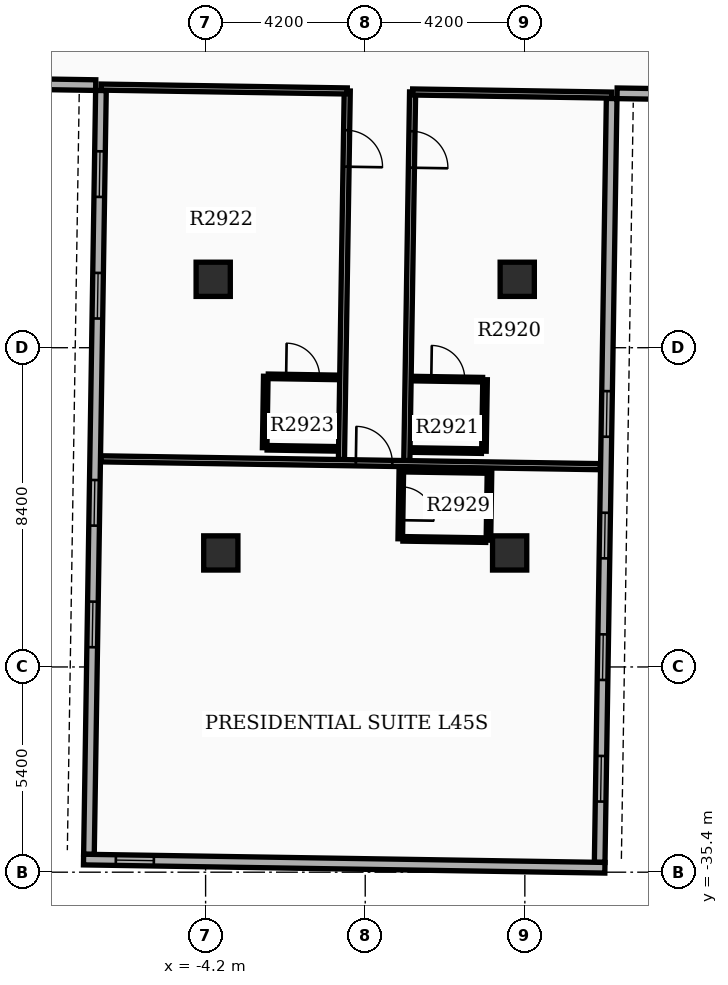
"""IFC4 building model, lengths in metres.
Left out: names, types, materials, properties, quantities, classifications, styles, units other than length and angle.
Written with IfcOpenShell. Run it as: python <this file> out.ifc"""

import sys

from ifc_helpers import new_model, si_unit, direction, frame, frame_2d, origin, origin_2d, place, context, subcontext, project, spatial, rectangle, extrude, element, fill, save


model = new_model("IFC4")
c1 = context("Model", 3, precision=1e-05, world=origin(), true_north=direction((0.0, 1.0)))
c2 = subcontext(c1, "Body", "Model", "MODEL_VIEW")
j1 = project(units=[si_unit("LENGTHUNIT", "METRE"), si_unit("PLANEANGLEUNIT", "RADIAN")], contexts=[c1])
p1 = place(None, origin())
s1 = spatial("IfcSite", under=j1, at=p1, CompositionType="ELEMENT")
p2 = place(p1, origin())
s2 = spatial("IfcBuilding", under=s1, at=p2, CompositionType="ELEMENT")
p3 = place(p2, frame((0.0, 0.0, 180.0)))
s3 = spatial("IfcBuildingStorey", under=s2, at=p3, CompositionType="ELEMENT", Elevation=180.0)
for number, where, z_axis, x_axis in (
    (1, (-4.0, -19.8, 0.0), (0.0, 0.0, 1.0), (1.0, 0.0, 0.0)),
    (2, (4.0, -19.8, 0.0), (0.0, 0.0, 1.0), (1.0, 0.0, 0.0)),
    (3, (-3.8, -27.0, 0.0), (0.0, 0.0, 1.0), (1.0, 0.0, 0.0)),
    (4, (3.8, -27.0, 0.0), (0.0, 0.0, 1.0), (1.0, 0.0, 0.0)),
):
    element("IfcColumn", number, at=place(p3, frame(where, z_axis=z_axis, x_axis=x_axis)), inside=s3, PredefinedType="COLUMN", context=c2, shape_type="SweptSolid", body=[
        extrude(rectangle(XDim=0.9, YDim=0.9, at=origin_2d()), origin(), (0.0, 0.0, 1.0), 3.9),
    ])
p4 = place(p3, frame((-6.954, -14.833, 0.0), z_axis=(0.0, 0.0, 1.0), x_axis=(-0.015705059908, -0.999876667941, 0.0)))
e5 = element("IfcWall", 5, at=p4, inside=s3, PredefinedType="STANDARD", context=c2, shape_type="SweptSolid", body=[
    extrude(rectangle(XDim=20.1, YDim=0.28, at=frame_2d((10.05, 0.0))), origin(), (0.0, 0.0, 1.0), 2.97),
])
p5 = place(p4, frame((1.6, 0.0, 0.8)))
e6 = element("IfcOpeningElement", 6, at=p5, cuts=e5, PredefinedType="OPENING", context=c2, shape_type="SweptSolid", body=[
    extrude(rectangle(XDim=1.2, YDim=1.6, at=frame_2d((0.6, 0.8))), frame((0.0, 0.15, 0.0), z_axis=(0.0, -1.0, 0.0), x_axis=(1.0, 0.0, 0.0)), (0.0, 0.0, 1.0), 0.3),
])
p6 = place(p4, frame((4.8, 0.0, 0.8)))
e7 = element("IfcOpeningElement", 7, at=p6, cuts=e5, PredefinedType="OPENING", context=c2, shape_type="SweptSolid", body=[
    extrude(rectangle(XDim=1.2, YDim=1.6, at=frame_2d((0.6, 0.8))), frame((0.0, 0.15, 0.0), z_axis=(0.0, -1.0, 0.0), x_axis=(1.0, 0.0, 0.0)), (0.0, 0.0, 1.0), 0.3),
])
p7 = place(p4, frame((10.25, 0.0, 0.8)))
e8 = element("IfcOpeningElement", 8, at=p7, cuts=e5, PredefinedType="OPENING", context=c2, shape_type="SweptSolid", body=[
    extrude(rectangle(XDim=1.2, YDim=1.6, at=frame_2d((0.6, 0.8))), frame((0.0, 0.15, 0.0), z_axis=(0.0, -1.0, 0.0), x_axis=(1.0, 0.0, 0.0)), (0.0, 0.0, 1.0), 0.3),
])
p8 = place(p4, frame((13.45, 0.0, 0.8)))
e9 = element("IfcOpeningElement", 9, at=p8, cuts=e5, PredefinedType="OPENING", context=c2, shape_type="SweptSolid", body=[
    extrude(rectangle(XDim=1.2, YDim=1.6, at=frame_2d((0.6, 0.8))), frame((0.0, 0.15, 0.0), z_axis=(0.0, -1.0, 0.0), x_axis=(1.0, 0.0, 0.0)), (0.0, 0.0, 1.0), 0.3),
])
p9 = place(p3, frame((6.169, -35.141, 0.0), z_axis=(0.0, 0.0, 1.0), x_axis=(0.01571739401, 0.999876474133, 0.0)))
e10 = element("IfcWall", 10, at=p9, inside=s3, PredefinedType="STANDARD", context=c2, shape_type="SweptSolid", body=[
    extrude(rectangle(XDim=20.1, YDim=0.28, at=frame_2d((10.05, 0.0))), origin(), (0.0, 0.0, 1.0), 2.97),
])
p10 = place(p9, frame((1.6, 0.0, 0.8)))
e11 = element("IfcOpeningElement", 11, at=p10, cuts=e10, PredefinedType="OPENING", context=c2, shape_type="SweptSolid", body=[
    extrude(rectangle(XDim=1.2, YDim=1.6, at=frame_2d((0.6, 0.8))), frame((0.0, 0.15, 0.0), z_axis=(0.0, -1.0, 0.0), x_axis=(1.0, 0.0, 0.0)), (0.0, 0.0, 1.0), 0.3),
])
p11 = place(p9, frame((4.8, 0.0, 0.8)))
e12 = element("IfcOpeningElement", 12, at=p11, cuts=e10, PredefinedType="OPENING", context=c2, shape_type="SweptSolid", body=[
    extrude(rectangle(XDim=1.2, YDim=1.6, at=frame_2d((0.6, 0.8))), frame((0.0, 0.15, 0.0), z_axis=(0.0, -1.0, 0.0), x_axis=(1.0, 0.0, 0.0)), (0.0, 0.0, 1.0), 0.3),
])
p12 = place(p9, frame((8.0, 0.0, 0.8)))
e13 = element("IfcOpeningElement", 13, at=p12, cuts=e10, PredefinedType="OPENING", context=c2, shape_type="SweptSolid", body=[
    extrude(rectangle(XDim=1.2, YDim=1.6, at=frame_2d((0.6, 0.8))), frame((0.0, 0.15, 0.0), z_axis=(0.0, -1.0, 0.0), x_axis=(1.0, 0.0, 0.0)), (0.0, 0.0, 1.0), 0.3),
])
p13 = place(p9, frame((11.2, 0.0, 0.8)))
e14 = element("IfcOpeningElement", 14, at=p13, cuts=e10, PredefinedType="OPENING", context=c2, shape_type="SweptSolid", body=[
    extrude(rectangle(XDim=1.2, YDim=1.6, at=frame_2d((0.6, 0.8))), frame((0.0, 0.15, 0.0), z_axis=(0.0, -1.0, 0.0), x_axis=(1.0, 0.0, 0.0)), (0.0, 0.0, 1.0), 0.3),
])
p14 = place(p3, frame((-7.412, -35.068, 0.0), z_axis=(0.0, 0.0, 1.0), x_axis=(0.999876549481, -0.015712599986, 0.0)))
e15 = element("IfcWall", 15, at=p14, inside=s3, PredefinedType="STANDARD", context=c2, shape_type="SweptSolid", body=[
    extrude(rectangle(XDim=13.72, YDim=0.28, at=frame_2d((6.86, 0.0))), origin(), (0.0, 0.0, 1.0), 2.97),
])
p15 = place(p14, frame((0.85, 0.0, 0.85)))
e16 = element("IfcOpeningElement", 16, at=p15, cuts=e15, PredefinedType="OPENING", context=c2, shape_type="SweptSolid", body=[
    extrude(rectangle(XDim=1.0, YDim=1.5, at=frame_2d((0.5, 0.75))), frame((0.0, 0.15, 0.0), z_axis=(0.0, -1.0, 0.0), x_axis=(1.0, 0.0, 0.0)), (0.0, 0.0, 1.0), 0.3),
])
p16 = place(p3, frame((-13.391, -14.592, 0.0), z_axis=(0.0, 0.0, 1.0), x_axis=(0.999876833368, -0.015694524359, 0.0)))
e17 = element("IfcWall", 17, at=p16, inside=s3, PredefinedType="STANDARD", context=c2, shape_type="SweptSolid", body=[
    extrude(rectangle(XDim=6.3, YDim=0.28, at=frame_2d((3.15, 0.0))), origin(), (0.0, 0.0, 1.0), 2.97),
])
p17 = place(p3, frame((12.926, -15.005, 0.0), z_axis=(0.0, 0.0, 1.0), x_axis=(-0.999876823822, 0.015695132501, 0.0)))
e18 = element("IfcWall", 18, at=p17, inside=s3, PredefinedType="STANDARD", context=c2, shape_type="SweptSolid", body=[
    extrude(rectangle(XDim=6.3, YDim=0.28, at=frame_2d((3.15, 0.0))), origin(), (0.0, 0.0, 1.0), 2.97),
])
p18 = place(p3, frame((1.247, -14.871, 0.0), z_axis=(0.0, 0.0, 1.0), x_axis=(-0.015705264399, -0.999876664729, 0.0)))
e19 = element("IfcWall", 19, at=p18, inside=s3, PredefinedType="PARTITIONING", context=c2, shape_type="SweptSolid", body=[
    extrude(rectangle(XDim=9.7, YDim=0.16, at=frame_2d((4.85, 0.0))), origin(), (0.0, 0.0, 1.0), 2.96),
])
p19 = place(p18, frame((1.033, 0.0, 0.0)))
e20 = element("IfcOpeningElement", 20, at=p19, cuts=e19, PredefinedType="OPENING", context=c2, shape_type="SweptSolid", body=[
    extrude(rectangle(XDim=0.96, YDim=2.15, at=frame_2d((0.48, 1.075))), frame((0.0, 0.09, 0.0), z_axis=(0.0, -1.0, 0.0), x_axis=(1.0, 0.0, 0.0)), (0.0, 0.0, 1.0), 0.18),
])
p20 = place(p3, frame((1.247, -14.871, 0.0), z_axis=(0.0, 0.0, 1.0), x_axis=(0.99987672073, -0.015701698737, 0.0)))
e21 = element("IfcWall", 21, at=p20, inside=s3, PredefinedType="PARTITIONING", context=c2, shape_type="SweptSolid", body=[
    extrude(rectangle(XDim=5.24, YDim=0.16, at=frame_2d((2.62, 0.0))), origin(), (0.0, 0.0, 1.0), 2.96),
])
p21 = place(p3, frame((1.268, -22.413, 0.0), z_axis=(0.0, 0.0, 1.0), x_axis=(0.999874722342, -0.015828443418, 0.0)))
e22 = element("IfcWall", 22, at=p21, inside=s3, PredefinedType="PARTITIONING", context=c2, shape_type="SweptSolid", body=[
    extrude(rectangle(XDim=1.82, YDim=0.12, at=frame_2d((0.91, 0.0))), origin(), (0.0, 0.0, 1.0), 2.96),
])
p22 = place(p21, frame((0.47, 0.0, 0.0)))
e23 = element("IfcOpeningElement", 23, at=p22, cuts=e22, PredefinedType="OPENING", context=c2, shape_type="SweptSolid", body=[
    extrude(rectangle(XDim=0.88, YDim=2.1, at=frame_2d((0.44, 1.05))), frame((0.0, 0.07, 0.0), z_axis=(0.0, -1.0, 0.0), x_axis=(1.0, 0.0, 0.0)), (0.0, 0.0, 1.0), 0.14),
])
p23 = place(p3, frame((1.239, -24.292, 0.0), z_axis=(0.0, 0.0, 1.0), x_axis=(0.999876836305, -0.015694337248, 0.0)))
e24 = element("IfcWall", 24, at=p23, inside=s3, PredefinedType="PARTITIONING", context=c2, shape_type="SweptSolid", body=[
    extrude(rectangle(XDim=1.82, YDim=0.12, at=frame_2d((0.91, 0.0))), origin(), (0.0, 0.0, 1.0), 2.96),
])
p24 = place(p3, frame((3.153, -22.442, 0.0), z_axis=(0.0, 0.0, 1.0), x_axis=(-0.015714386166, -0.99987652141, 0.0)))
e25 = element("IfcWall", 25, at=p24, inside=s3, PredefinedType="PARTITIONING", context=c2, shape_type="SweptSolid", body=[
    extrude(rectangle(XDim=1.88, YDim=0.12, at=frame_2d((0.94, 0.0))), origin(), (0.0, 0.0, 1.0), 2.96),
])
p25 = place(p3, frame((-0.473, -14.844, 0.0), z_axis=(0.0, 0.0, 1.0), x_axis=(-0.015705659641, -0.999876658521, 0.0)))
e26 = element("IfcWall", 26, at=p25, inside=s3, PredefinedType="PARTITIONING", context=c2, shape_type="SweptSolid", body=[
    extrude(rectangle(XDim=9.7, YDim=0.16, at=frame_2d((4.85, 0.0))), origin(), (0.0, 0.0, 1.0), 2.96),
])
p26 = place(p25, frame((1.033, 0.0, 0.0)))
e27 = element("IfcOpeningElement", 27, at=p26, cuts=e26, PredefinedType="OPENING", context=c2, shape_type="SweptSolid", body=[
    extrude(rectangle(XDim=0.96, YDim=2.15, at=frame_2d((0.48, 1.075))), frame((0.0, 0.09, 0.0), z_axis=(0.0, -1.0, 0.0), x_axis=(1.0, 0.0, 0.0)), (0.0, 0.0, 1.0), 0.18),
])
p27 = place(p3, frame((-0.473, -14.844, 0.0), z_axis=(0.0, 0.0, 1.0), x_axis=(-0.999876577995, 0.015710785373, 0.0)))
e28 = element("IfcWall", 28, at=p27, inside=s3, PredefinedType="PARTITIONING", context=c2, shape_type="SweptSolid", body=[
    extrude(rectangle(XDim=6.48, YDim=0.16, at=frame_2d((3.24, 0.0))), origin(), (0.0, 0.0, 1.0), 2.96),
])
p28 = place(p3, frame((-2.552, -22.353, 0.0), z_axis=(0.0, 0.0, 1.0), x_axis=(0.999876836305, -0.015694337248, 0.0)))
e29 = element("IfcWall", 29, at=p28, inside=s3, PredefinedType="PARTITIONING", context=c2, shape_type="SweptSolid", body=[
    extrude(rectangle(XDim=1.82, YDim=0.12, at=frame_2d((0.91, 0.0))), origin(), (0.0, 0.0, 1.0), 2.96),
])
p29 = place(p28, frame((0.47, 0.0, 0.0)))
e30 = element("IfcOpeningElement", 30, at=p29, cuts=e29, PredefinedType="OPENING", context=c2, shape_type="SweptSolid", body=[
    extrude(rectangle(XDim=0.88, YDim=2.1, at=frame_2d((0.44, 1.05))), frame((0.0, 0.07, 0.0), z_axis=(0.0, -1.0, 0.0), x_axis=(1.0, 0.0, 0.0)), (0.0, 0.0, 1.0), 0.14),
])
p30 = place(p3, frame((-2.581, -24.232, 0.0), z_axis=(0.0, 0.0, 1.0), x_axis=(0.999876803258, -0.015696442504, 0.0)))
e31 = element("IfcWall", 31, at=p30, inside=s3, PredefinedType="PARTITIONING", context=c2, shape_type="SweptSolid", body=[
    extrude(rectangle(XDim=1.82, YDim=0.12, at=frame_2d((0.91, 0.0))), origin(), (0.0, 0.0, 1.0), 2.96),
])
p31 = place(p3, frame((-2.616, -22.352, 0.0), z_axis=(0.0, 0.0, 1.0), x_axis=(-0.015714386166, -0.99987652141, 0.0)))
e32 = element("IfcWall", 32, at=p31, inside=s3, PredefinedType="PARTITIONING", context=c2, shape_type="SweptSolid", body=[
    extrude(rectangle(XDim=1.88, YDim=0.12, at=frame_2d((0.94, 0.0))), origin(), (0.0, 0.0, 1.0), 2.96),
])
p32 = place(p3, frame((-6.958, -24.524, 0.0), z_axis=(0.0, 0.0, 1.0), x_axis=(0.999876528878, -0.015713911007, 0.0)))
e33 = element("IfcWall", 33, at=p32, inside=s3, PredefinedType="PARTITIONING", context=c2, shape_type="SweptSolid", body=[
    extrude(rectangle(XDim=13.144, YDim=0.16, at=frame_2d((6.572, 0.0))), origin(), (0.0, 0.0, 1.0), 2.96),
])
p33 = place(p32, frame((6.712, 0.0, 0.0)))
e34 = element("IfcOpeningElement", 34, at=p33, cuts=e33, PredefinedType="OPENING", context=c2, shape_type="SweptSolid", body=[
    extrude(rectangle(XDim=0.96, YDim=2.15, at=frame_2d((0.48, 1.075))), frame((0.0, 0.09, 0.0), z_axis=(0.0, -1.0, 0.0), x_axis=(1.0, 0.0, 0.0)), (0.0, 0.0, 1.0), 0.18),
])
p34 = place(p3, frame((0.95, -24.808, 0.0), z_axis=(0.0, 0.0, 1.0), x_axis=(-0.015696442504, -0.999876803258, 0.0)))
e35 = element("IfcWall", 35, at=p34, inside=s3, PredefinedType="PARTITIONING", context=c2, shape_type="SweptSolid", body=[
    extrude(rectangle(XDim=1.82, YDim=0.12, at=frame_2d((0.91, 0.0))), origin(), (0.0, 0.0, 1.0), 2.96),
])
p35 = place(p34, frame((0.45, 0.0, 0.0)))
e36 = element("IfcOpeningElement", 36, at=p35, cuts=e35, PredefinedType="OPENING", context=c2, shape_type="SweptSolid", body=[
    extrude(rectangle(XDim=0.88, YDim=2.1, at=frame_2d((0.44, 1.05))), frame((0.0, 0.07, 0.0), z_axis=(0.0, -1.0, 0.0), x_axis=(1.0, 0.0, 0.0)), (0.0, 0.0, 1.0), 0.14),
])
p36 = place(p3, frame((3.27, -24.844, 0.0), z_axis=(0.0, 0.0, 1.0), x_axis=(-0.015694337248, -0.999876836305, 0.0)))
e37 = element("IfcWall", 37, at=p36, inside=s3, PredefinedType="PARTITIONING", context=c2, shape_type="SweptSolid", body=[
    extrude(rectangle(XDim=1.82, YDim=0.12, at=frame_2d((0.91, 0.0))), origin(), (0.0, 0.0, 1.0), 2.96),
])
for number, where, z_axis, x_axis in (
    (38, (1.021, -24.809, 0.0), (0.0, 0.0, 1.0), (1.0, -0.016, 0.0)),
    (39, (0.992, -26.629, 0.0), (0.0, 0.0, 1.0), (1.0, -0.016, 0.0)),
):
    element("IfcWall", number, at=place(p3, frame(where, z_axis=z_axis, x_axis=x_axis)), inside=s3, PredefinedType="PARTITIONING", context=c2, shape_type="SweptSolid", body=[
        extrude(rectangle(XDim=2.18, YDim=0.12, at=frame_2d((1.09, 0.0))), origin(), (0.0, 0.0, 1.0), 2.96),
    ])
p37 = place(p5, origin())
e40 = element("IfcWindow", 40, at=p37, inside=s3, PartitioningType="SINGLE_PANEL", PredefinedType="WINDOW", context=c2, shape_type="SweptSolid", body=[
    extrude(rectangle(XDim=1.2, YDim=1.6, at=frame_2d((0.6, 0.8))), frame((0.0, 0.03, 0.0), z_axis=(0.0, -1.0, 0.0), x_axis=(1.0, 0.0, 0.0)), (0.0, 0.0, 1.0), 0.06),
])
fill(e6, e40)
p38 = place(p6, origin())
e41 = element("IfcWindow", 41, at=p38, inside=s3, PartitioningType="SINGLE_PANEL", PredefinedType="WINDOW", context=c2, shape_type="SweptSolid", body=[
    extrude(rectangle(XDim=1.2, YDim=1.6, at=frame_2d((0.6, 0.8))), frame((0.0, 0.03, 0.0), z_axis=(0.0, -1.0, 0.0), x_axis=(1.0, 0.0, 0.0)), (0.0, 0.0, 1.0), 0.06),
])
fill(e7, e41)
p39 = place(p7, origin())
e42 = element("IfcWindow", 42, at=p39, inside=s3, PartitioningType="SINGLE_PANEL", PredefinedType="WINDOW", context=c2, shape_type="SweptSolid", body=[
    extrude(rectangle(XDim=1.2, YDim=1.6, at=frame_2d((0.6, 0.8))), frame((0.0, 0.03, 0.0), z_axis=(0.0, -1.0, 0.0), x_axis=(1.0, 0.0, 0.0)), (0.0, 0.0, 1.0), 0.06),
])
fill(e8, e42)
p40 = place(p8, origin())
e43 = element("IfcWindow", 43, at=p40, inside=s3, PartitioningType="SINGLE_PANEL", PredefinedType="WINDOW", context=c2, shape_type="SweptSolid", body=[
    extrude(rectangle(XDim=1.2, YDim=1.6, at=frame_2d((0.6, 0.8))), frame((0.0, 0.03, 0.0), z_axis=(0.0, -1.0, 0.0), x_axis=(1.0, 0.0, 0.0)), (0.0, 0.0, 1.0), 0.06),
])
fill(e9, e43)
p41 = place(p10, origin())
e44 = element("IfcWindow", 44, at=p41, inside=s3, PartitioningType="SINGLE_PANEL", PredefinedType="WINDOW", context=c2, shape_type="SweptSolid", body=[
    extrude(rectangle(XDim=1.2, YDim=1.6, at=frame_2d((0.6, 0.8))), frame((0.0, 0.03, 0.0), z_axis=(0.0, -1.0, 0.0), x_axis=(1.0, 0.0, 0.0)), (0.0, 0.0, 1.0), 0.06),
])
fill(e11, e44)
p42 = place(p11, origin())
e45 = element("IfcWindow", 45, at=p42, inside=s3, PartitioningType="SINGLE_PANEL", PredefinedType="WINDOW", context=c2, shape_type="SweptSolid", body=[
    extrude(rectangle(XDim=1.2, YDim=1.6, at=frame_2d((0.6, 0.8))), frame((0.0, 0.03, 0.0), z_axis=(0.0, -1.0, 0.0), x_axis=(1.0, 0.0, 0.0)), (0.0, 0.0, 1.0), 0.06),
])
fill(e12, e45)
p43 = place(p12, origin())
e46 = element("IfcWindow", 46, at=p43, inside=s3, PartitioningType="SINGLE_PANEL", PredefinedType="WINDOW", context=c2, shape_type="SweptSolid", body=[
    extrude(rectangle(XDim=1.2, YDim=1.6, at=frame_2d((0.6, 0.8))), frame((0.0, 0.03, 0.0), z_axis=(0.0, -1.0, 0.0), x_axis=(1.0, 0.0, 0.0)), (0.0, 0.0, 1.0), 0.06),
])
fill(e13, e46)
p44 = place(p13, origin())
e47 = element("IfcWindow", 47, at=p44, inside=s3, PartitioningType="SINGLE_PANEL", PredefinedType="WINDOW", context=c2, shape_type="SweptSolid", body=[
    extrude(rectangle(XDim=1.2, YDim=1.6, at=frame_2d((0.6, 0.8))), frame((0.0, 0.03, 0.0), z_axis=(0.0, -1.0, 0.0), x_axis=(1.0, 0.0, 0.0)), (0.0, 0.0, 1.0), 0.06),
])
fill(e14, e47)
p45 = place(p15, origin())
e48 = element("IfcWindow", 48, at=p45, inside=s3, PartitioningType="SINGLE_PANEL", PredefinedType="WINDOW", context=c2, shape_type="SweptSolid", body=[
    extrude(rectangle(XDim=1.0, YDim=1.5, at=frame_2d((0.5, 0.75))), frame((0.0, 0.03, 0.0), z_axis=(0.0, -1.0, 0.0), x_axis=(1.0, 0.0, 0.0)), (0.0, 0.0, 1.0), 0.06),
])
fill(e16, e48)
p46 = place(p19, origin())
e49 = element("IfcDoor", 49, at=p46, inside=s3, OperationType="SINGLE_SWING_RIGHT", PredefinedType="DOOR", context=c2, shape_type="SweptSolid", body=[
    extrude(rectangle(XDim=0.96, YDim=2.15, at=frame_2d((0.48, 1.075))), frame((0.0, 0.025, 0.0), z_axis=(0.0, -1.0, 0.0), x_axis=(1.0, 0.0, 0.0)), (0.0, 0.0, 1.0), 0.05),
])
fill(e20, e49)
p47 = place(p22, origin())
e50 = element("IfcDoor", 50, at=p47, inside=s3, OperationType="SINGLE_SWING_LEFT", PredefinedType="DOOR", context=c2, shape_type="SweptSolid", body=[
    extrude(rectangle(XDim=0.88, YDim=2.1, at=frame_2d((0.44, 1.05))), frame((0.0, 0.025, 0.0), z_axis=(0.0, -1.0, 0.0), x_axis=(1.0, 0.0, 0.0)), (0.0, 0.0, 1.0), 0.05),
])
fill(e23, e50)
p48 = place(p26, origin())
e51 = element("IfcDoor", 51, at=p48, inside=s3, OperationType="SINGLE_SWING_RIGHT", PredefinedType="DOOR", context=c2, shape_type="SweptSolid", body=[
    extrude(rectangle(XDim=0.96, YDim=2.15, at=frame_2d((0.48, 1.075))), frame((0.0, 0.025, 0.0), z_axis=(0.0, -1.0, 0.0), x_axis=(1.0, 0.0, 0.0)), (0.0, 0.0, 1.0), 0.05),
])
fill(e27, e51)
p49 = place(p29, origin())
e52 = element("IfcDoor", 52, at=p49, inside=s3, OperationType="SINGLE_SWING_LEFT", PredefinedType="DOOR", context=c2, shape_type="SweptSolid", body=[
    extrude(rectangle(XDim=0.88, YDim=2.1, at=frame_2d((0.44, 1.05))), frame((0.0, 0.025, 0.0), z_axis=(0.0, -1.0, 0.0), x_axis=(1.0, 0.0, 0.0)), (0.0, 0.0, 1.0), 0.05),
])
fill(e30, e52)
p50 = place(p33, origin())
e53 = element("IfcDoor", 53, at=p50, inside=s3, OperationType="SINGLE_SWING_LEFT", PredefinedType="DOOR", context=c2, shape_type="SweptSolid", body=[
    extrude(rectangle(XDim=0.96, YDim=2.15, at=frame_2d((0.48, 1.075))), frame((0.0, 0.025, 0.0), z_axis=(0.0, -1.0, 0.0), x_axis=(1.0, 0.0, 0.0)), (0.0, 0.0, 1.0), 0.05),
])
fill(e34, e53)
p51 = place(p35, origin())
e54 = element("IfcDoor", 54, at=p51, inside=s3, OperationType="SINGLE_SWING_RIGHT", PredefinedType="DOOR", context=c2, shape_type="SweptSolid", body=[
    extrude(rectangle(XDim=0.88, YDim=2.1, at=frame_2d((0.44, 1.05))), frame((0.0, 0.025, 0.0), z_axis=(0.0, -1.0, 0.0), x_axis=(1.0, 0.0, 0.0)), (0.0, 0.0, 1.0), 0.05),
])
fill(e36, e54)
save(model, sys.argv[1])
